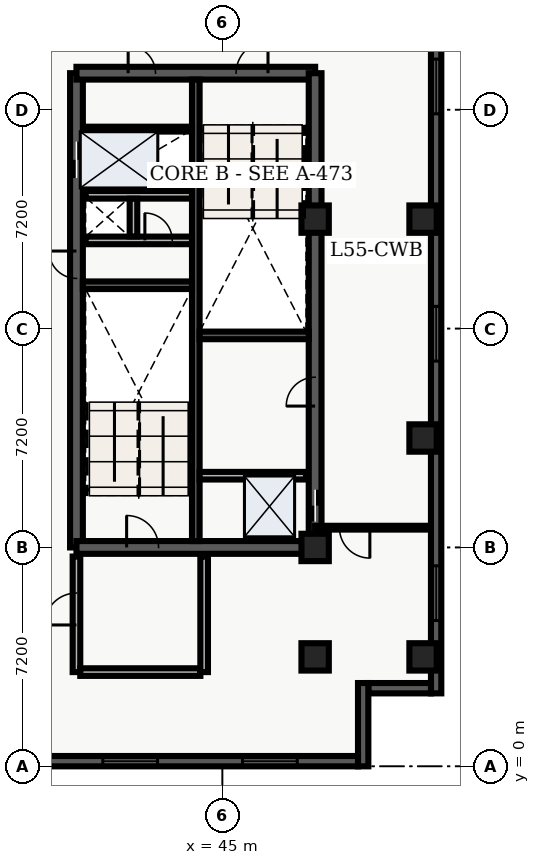
"""IFC4 building model, lengths in metres.
Left out: names, types, materials, properties, quantities, classifications, styles, units other than length and angle.
Written with IfcOpenShell. Run it as: python <this file> out.ifc"""

import sys

from ifc_helpers import new_model, entity, si_unit, converted_unit, direction, frame, origin_with_axes, origin_2d_with_axis, place, context, subcontext, project, spatial, polyline, rectangle, outline, extrude, element, fill, save


model = new_model("IFC4")
c1 = context("Model", 3, precision=1e-05, world=origin_with_axes(), true_north=direction((0.0, 1.0)))
c2 = subcontext(c1, "Body", "Model", "MODEL_VIEW")
j1 = project(units=[si_unit("LENGTHUNIT", "METRE"), converted_unit("PLANEANGLEUNIT", "DEGREE", entity("IfcPlaneAngleMeasure", 0.017), si_unit("PLANEANGLEUNIT", "RADIAN"), dimensions=[0, 0, 0, 0, 0, 0, 0])], contexts=[c1])
p1 = place(None, origin_with_axes())
s1 = spatial("IfcSite", under=j1, at=p1, CompositionType="ELEMENT")
p2 = place(p1, origin_with_axes())
s2 = spatial("IfcBuilding", under=s1, at=p2, CompositionType="ELEMENT")
p3 = place(p2, frame((0.0, 0.0, 224.7), z_axis=(0.0, 0.0, 1.0), x_axis=(1.0, 0.0, 0.0)))
s3 = spatial("IfcBuildingStorey", under=s2, at=p3, CompositionType="ELEMENT", Elevation=224.7)
p4 = place(p3, frame((40.2, 7.2, 0.0), z_axis=(0.0, 0.0, 1.0), x_axis=(0.0, 1.0, 0.0)))
e1 = element("IfcWall", 1, at=p4, inside=s3, PredefinedType="SHEAR", context=c2, shape_type="SweptSolid", body=[
    extrude(outline(polyline([(0.0, -0.21), (15.6, -0.21), (15.6, 0.21), (0.0, 0.21), (0.0, -0.21)])), origin_with_axes(), (0.0, 0.0, 1.0), 3.66),
])
p5 = place(p4, frame((12.75, 0.0, 0.0), z_axis=(0.0, 0.0, 1.0), x_axis=(1.0, 0.0, 0.0)))
e2 = element("IfcOpeningElement", 2, at=p5, cuts=e1, PredefinedType="OPENING", context=c2, shape_type="SweptSolid", body=[
    extrude(rectangle(XDim=1.2, YDim=0.44, at=origin_2d_with_axis()), origin_with_axes(), (0.0, 0.0, 1.0), 2.15),
])
p6 = place(p4, frame((9.3, 0.0, 0.0), z_axis=(0.0, 0.0, 1.0), x_axis=(1.0, 0.0, 0.0)))
e3 = element("IfcOpeningElement", 3, at=p6, cuts=e1, PredefinedType="OPENING", context=c2, shape_type="SweptSolid", body=[
    extrude(rectangle(XDim=0.9, YDim=0.44, at=origin_2d_with_axis()), origin_with_axes(), (0.0, 0.0, 1.0), 2.15),
])
p7 = place(p3, frame((40.2, 7.2, 0.0), z_axis=(0.0, 0.0, 1.0), x_axis=(1.0, 0.0, 0.0)))
e4 = element("IfcWall", 4, at=p7, inside=s3, PredefinedType="SHEAR", context=c2, shape_type="SweptSolid", body=[
    extrude(outline(polyline([(0.0, -0.21), (7.85, -0.21), (7.85, 0.21), (0.0, 0.21), (0.0, -0.21)])), origin_with_axes(), (0.0, 0.0, 1.0), 3.66),
])
p8 = place(p7, frame((2.175, 0.0, 0.0), z_axis=(0.0, 0.0, 1.0), x_axis=(1.0, 0.0, 0.0)))
e5 = element("IfcOpeningElement", 5, at=p8, cuts=e4, PredefinedType="OPENING", context=c2, shape_type="SweptSolid", body=[
    extrude(rectangle(XDim=1.05, YDim=0.44, at=origin_2d_with_axis()), origin_with_axes(), (0.0, 0.0, 1.0), 2.15),
])
p9 = place(p3, frame((40.2, 22.8, 0.0), z_axis=(0.0, 0.0, 1.0), x_axis=(1.0, 0.0, 0.0)))
e6 = element("IfcWall", 6, at=p9, inside=s3, PredefinedType="SHEAR", context=c2, shape_type="SweptSolid", body=[
    extrude(outline(polyline([(0.0, -0.21), (7.85, -0.21), (7.85, 0.21), (0.0, 0.21), (0.0, -0.21)])), origin_with_axes(), (0.0, 0.0, 1.0), 3.66),
])
p10 = place(p9, frame((5.775, 0.0, 0.0), z_axis=(0.0, 0.0, 1.0), x_axis=(1.0, 0.0, 0.0)))
e7 = element("IfcOpeningElement", 7, at=p10, cuts=e6, PredefinedType="OPENING", context=c2, shape_type="SweptSolid", body=[
    extrude(rectangle(XDim=1.05, YDim=0.44, at=origin_2d_with_axis()), origin_with_axes(), (0.0, 0.0, 1.0), 2.15),
])
p11 = place(p9, frame((2.15, 0.0, 0.0), z_axis=(0.0, 0.0, 1.0), x_axis=(1.0, 0.0, 0.0)))
e8 = element("IfcOpeningElement", 8, at=p11, cuts=e6, PredefinedType="OPENING", context=c2, shape_type="SweptSolid", body=[
    extrude(rectangle(XDim=0.9, YDim=0.44, at=origin_2d_with_axis()), origin_with_axes(), (0.0, 0.0, 1.0), 2.15),
])
p12 = place(p3, frame((48.05, 7.2, 0.0), z_axis=(0.0, 0.0, 1.0), x_axis=(0.0, 1.0, 0.0)))
e9 = element("IfcWall", 9, at=p12, inside=s3, PredefinedType="SHEAR", context=c2, shape_type="SweptSolid", body=[
    extrude(outline(polyline([(0.0, -0.21), (15.6, -0.21), (15.6, 0.21), (0.0, 0.21), (0.0, -0.21)])), origin_with_axes(), (0.0, 0.0, 1.0), 3.66),
])
p13 = place(p12, frame((1.375, 0.0, 0.0), z_axis=(0.0, 0.0, 1.0), x_axis=(1.0, 0.0, 0.0)))
e10 = element("IfcOpeningElement", 10, at=p13, cuts=e9, PredefinedType="OPENING", context=c2, shape_type="SweptSolid", body=[
    extrude(rectangle(XDim=1.05, YDim=0.44, at=origin_2d_with_axis()), origin_with_axes(), (0.0, 0.0, 1.0), 2.15),
])
p14 = place(p12, frame((5.125, 0.0, 0.0), z_axis=(0.0, 0.0, 1.0), x_axis=(1.0, 0.0, 0.0)))
e11 = element("IfcOpeningElement", 11, at=p14, cuts=e9, PredefinedType="OPENING", context=c2, shape_type="SweptSolid", body=[
    extrude(rectangle(XDim=0.95, YDim=0.44, at=origin_2d_with_axis()), origin_with_axes(), (0.0, 0.0, 1.0), 2.15),
])
p15 = place(p3, frame((44.125, 7.41, 0.0), z_axis=(0.0, 0.0, 1.0), x_axis=(0.0, 1.0, 0.0)))
e12 = element("IfcWall", 12, at=p15, inside=s3, PredefinedType="SHEAR", context=c2, shape_type="SweptSolid", body=[
    extrude(outline(polyline([(0.0, -0.125), (15.18, -0.125), (15.18, 0.125), (0.0, 0.125), (0.0, -0.125)])), origin_with_axes(), (0.0, 0.0, 1.0), 3.66),
])
for number, where, z_axis, x_axis in (
    (13, (40.41, 15.825, 0.0), (0.0, 0.0, 1.0), (1.0, 0.0, 0.0)),
    (14, (44.25, 14.175, 0.0), (0.0, 0.0, 1.0), (1.0, 0.0, 0.0)),
):
    element("IfcWall", number, at=place(p3, frame(where, z_axis=z_axis, x_axis=x_axis)), inside=s3, PredefinedType="SHEAR", context=c2, shape_type="SweptSolid", body=[
        extrude(outline(polyline([(0.0, -0.125), (3.59, -0.125), (3.59, 0.125), (0.0, 0.125), (0.0, -0.125)])), origin_with_axes(), (0.0, 0.0, 1.0), 3.66),
    ])
p16 = place(p3, frame((40.5, 17.3, 0.0), z_axis=(0.0, 0.0, 1.0), x_axis=(1.0, 0.0, 0.0)))
e15 = element("IfcWall", 15, at=p16, inside=s3, PredefinedType="SOLIDWALL", context=c2, shape_type="SweptSolid", body=[
    extrude(outline(polyline([(0.0, -0.125), (3.5, -0.125), (3.5, 0.125), (0.0, 0.125), (0.0, -0.125)])), origin_with_axes(), (0.0, 0.0, 1.0), 2.7),
])
p17 = place(p16, frame((2.4, 0.0, 0.0), z_axis=(0.0, 0.0, 1.0), x_axis=(1.0, 0.0, 0.0)))
e16 = element("IfcOpeningElement", 16, at=p17, cuts=e15, PredefinedType="OPENING", context=c2, shape_type="SweptSolid", body=[
    extrude(rectangle(XDim=0.9, YDim=0.27, at=origin_2d_with_axis()), origin_with_axes(), (0.0, 0.0, 1.0), 2.15),
])
p18 = place(p3, frame((40.5, 18.8, 0.0), z_axis=(0.0, 0.0, 1.0), x_axis=(1.0, 0.0, 0.0)))
e17 = element("IfcWall", 17, at=p18, inside=s3, PredefinedType="SOLIDWALL", context=c2, shape_type="SweptSolid", body=[
    extrude(outline(polyline([(0.0, -0.125), (3.5, -0.125), (3.5, 0.125), (0.0, 0.125), (0.0, -0.125)])), origin_with_axes(), (0.0, 0.0, 1.0), 2.7),
])
p19 = place(p3, frame((42.075, 17.43, 0.0), z_axis=(0.0, 0.0, 1.0), x_axis=(0.0, 1.0, 0.0)))
e18 = element("IfcWall", 18, at=p19, inside=s3, PredefinedType="SOLIDWALL", context=c2, shape_type="SweptSolid", body=[
    extrude(outline(polyline([(0.0, -0.125), (1.24, -0.125), (1.24, 0.125), (0.0, 0.125), (0.0, -0.125)])), origin_with_axes(), (0.0, 0.0, 1.0), 2.7),
])
p20 = place(p3, frame((40.2, 3.1, 0.0), z_axis=(0.0, 0.0, 1.0), x_axis=(0.0, 1.0, 0.0)))
e19 = element("IfcWall", 19, at=p20, inside=s3, PredefinedType="SOLIDWALL", context=c2, shape_type="SweptSolid", body=[
    extrude(outline(polyline([(0.0, -0.125), (3.8, -0.125), (3.8, 0.125), (0.0, 0.125), (0.0, -0.125)])), origin_with_axes(), (0.0, 0.0, 1.0), 2.7),
])
p21 = place(p20, frame((2.075, 0.0, 0.0), z_axis=(0.0, 0.0, 1.0), x_axis=(1.0, 0.0, 0.0)))
e20 = element("IfcOpeningElement", 20, at=p21, cuts=e19, PredefinedType="OPENING", context=c2, shape_type="SweptSolid", body=[
    extrude(rectangle(XDim=1.05, YDim=0.27, at=origin_2d_with_axis()), origin_with_axes(), (0.0, 0.0, 1.0), 2.15),
])
p22 = place(p3, frame((40.325, 3.1, 0.0), z_axis=(0.0, 0.0, 1.0), x_axis=(1.0, 0.0, 0.0)))
e21 = element("IfcWall", 21, at=p22, inside=s3, PredefinedType="SOLIDWALL", context=c2, shape_type="SweptSolid", body=[
    extrude(outline(polyline([(0.0, -0.125), (3.95, -0.125), (3.95, 0.125), (0.0, 0.125), (0.0, -0.125)])), origin_with_axes(), (0.0, 0.0, 1.0), 2.7),
])
p23 = place(p3, frame((44.4, 3.1, 0.0), z_axis=(0.0, 0.0, 1.0), x_axis=(0.0, 1.0, 0.0)))
e22 = element("IfcWall", 22, at=p23, inside=s3, PredefinedType="SOLIDWALL", context=c2, shape_type="SweptSolid", body=[
    extrude(outline(polyline([(0.0, -0.125), (3.8, -0.125), (3.8, 0.125), (0.0, 0.125), (0.0, -0.125)])), origin_with_axes(), (0.0, 0.0, 1.0), 2.7),
])
for number, where, z_axis, x_axis in (
    (23, (48.05, 3.6, 0.0), (0.0, 0.0, 1.0), (1.0, 0.0, 0.0)),
    (24, (48.05, 7.2, 0.0), (0.0, 0.0, 1.0), (1.0, 0.0, 0.0)),
    (25, (48.05, 18.0, 0.0), (0.0, 0.0, 1.0), (1.0, 0.0, 0.0)),
    (26, (51.6, 3.6, 0.0), (0.0, 0.0, 1.0), (1.0, 0.0, 0.0)),
    (27, (51.6, 10.8, 0.0), (0.0, 0.0, 1.0), (1.0, 0.0, 0.0)),
    (28, (51.6, 18.0, 0.0), (0.0, 0.0, 1.0), (1.0, 0.0, 0.0)),
):
    element("IfcColumn", number, at=place(p3, frame(where, z_axis=z_axis, x_axis=x_axis)), inside=s3, PredefinedType="COLUMN", context=c2, shape_type="SweptSolid", body=[
        extrude(rectangle(XDim=0.9, YDim=0.9, at=origin_2d_with_axis()), origin_with_axes(), (0.0, 0.0, 1.0), 3.9),
    ])
p24 = place(p3, frame((40.5, 20.96, 0.0), z_axis=(0.0, 0.0, 1.0), x_axis=(1.0, 0.0, 0.0)))
e29 = element("IfcWall", 29, at=p24, inside=s3, PredefinedType="PARTITIONING", context=c2, shape_type="SweptSolid", body=[
    extrude(outline(polyline([(0.0, -0.08), (3.5, -0.08), (3.5, 0.08), (0.0, 0.08), (0.0, -0.08)])), origin_with_axes(), (0.0, 0.0, 1.0), 2.7),
])
p25 = place(p3, frame((44.25, 9.56, 0.0), z_axis=(0.0, 0.0, 1.0), x_axis=(1.0, 0.0, 0.0)))
e30 = element("IfcWall", 30, at=p25, inside=s3, PredefinedType="SOLIDWALL", context=c2, shape_type="SweptSolid", body=[
    extrude(outline(polyline([(0.0, -0.125), (3.5, -0.125), (3.5, 0.125), (0.0, 0.125), (0.0, -0.125)])), origin_with_axes(), (0.0, 0.0, 1.0), 2.7),
])
p26 = place(p3, frame((51.865, 7.85, 0.0), z_axis=(0.0, 0.0, 1.0), x_axis=(-1.0, 0.0, 0.0)))
e31 = element("IfcWall", 31, at=p26, inside=s3, PredefinedType="PARTITIONING", context=c2, shape_type="SweptSolid", body=[
    extrude(outline(polyline([(0.0, -0.062), (3.815, -0.062), (3.815, 0.062), (0.0, 0.062), (0.0, -0.062)])), origin_with_axes(), (0.0, 0.0, 1.0), 2.7),
])
p27 = place(p26, frame((2.515, 0.0, 0.0), z_axis=(0.0, 0.0, 1.0), x_axis=(1.0, 0.0, 0.0)))
e32 = element("IfcOpeningElement", 32, at=p27, cuts=e31, PredefinedType="OPENING", context=c2, shape_type="SweptSolid", body=[
    extrude(rectangle(XDim=1.0, YDim=0.145, at=origin_2d_with_axis()), origin_with_axes(), (0.0, 0.0, 1.0), 2.15),
])
p28 = place(p3, frame((52.03, 26.06, 0.0), z_axis=(0.0, 0.0, 1.0), x_axis=(0.0, -1.0, 0.0)))
e33 = element("IfcWall", 33, at=p28, inside=s3, PredefinedType="SOLIDWALL", context=c2, shape_type="SweptSolid", body=[
    extrude(outline(polyline([(0.0, -0.17), (23.66, -0.17), (23.66, 0.17), (0.0, 0.17), (0.0, -0.17)])), origin_with_axes(), (0.0, 0.0, 1.0), 3.66),
])
p29 = place(p28, frame((3.696, 0.0, 0.45), z_axis=(0.0, 0.0, 1.0), x_axis=(1.0, 0.0, 0.0)))
e34 = element("IfcOpeningElement", 34, at=p29, cuts=e33, PredefinedType="OPENING", context=c2, shape_type="SweptSolid", body=[
    extrude(rectangle(XDim=1.8, YDim=0.36, at=origin_2d_with_axis()), origin_with_axes(), (0.0, 0.0, 1.0), 2.1),
])
p30 = place(p28, frame((11.83, 0.0, 0.45), z_axis=(0.0, 0.0, 1.0), x_axis=(1.0, 0.0, 0.0)))
e35 = element("IfcOpeningElement", 35, at=p30, cuts=e33, PredefinedType="OPENING", context=c2, shape_type="SweptSolid", body=[
    extrude(rectangle(XDim=1.8, YDim=0.36, at=origin_2d_with_axis()), origin_with_axes(), (0.0, 0.0, 1.0), 2.1),
])
p31 = place(p28, frame((20.364, 0.0, 0.45), z_axis=(0.0, 0.0, 1.0), x_axis=(1.0, 0.0, 0.0)))
e36 = element("IfcOpeningElement", 36, at=p31, cuts=e33, PredefinedType="OPENING", context=c2, shape_type="SweptSolid", body=[
    extrude(rectangle(XDim=1.8, YDim=0.36, at=origin_2d_with_axis()), origin_with_axes(), (0.0, 0.0, 1.0), 2.1),
])
p32 = place(p3, frame((51.86, 2.57, 0.0), z_axis=(0.0, 0.0, 1.0), x_axis=(-1.0, 0.0, 0.0)))
e37 = element("IfcWall", 37, at=p32, inside=s3, PredefinedType="SOLIDWALL", context=c2, shape_type="SweptSolid", body=[
    extrude(outline(polyline([(0.0, -0.17), (2.06, -0.17), (2.06, 0.17), (0.0, 0.17), (0.0, -0.17)])), origin_with_axes(), (0.0, 0.0, 1.0), 3.66),
])
p33 = place(p3, frame((49.63, 2.74, 0.0), z_axis=(0.0, 0.0, 1.0), x_axis=(0.0, -1.0, 0.0)))
e38 = element("IfcWall", 38, at=p33, inside=s3, PredefinedType="SOLIDWALL", context=c2, shape_type="SweptSolid", body=[
    extrude(outline(polyline([(0.0, -0.17), (2.74, -0.17), (2.74, 0.17), (0.0, 0.17), (0.0, -0.17)])), origin_with_axes(), (0.0, 0.0, 1.0), 3.66),
])
p34 = place(p3, frame((49.46, 0.17, 0.0), z_axis=(0.0, 0.0, 1.0), x_axis=(-1.0, 0.0, 0.0)))
e39 = element("IfcWall", 39, at=p34, inside=s3, PredefinedType="SOLIDWALL", context=c2, shape_type="SweptSolid", body=[
    extrude(outline(polyline([(0.0, -0.17), (42.56, -0.17), (42.56, 0.17), (0.0, 0.17), (0.0, -0.17)])), origin_with_axes(), (0.0, 0.0, 1.0), 3.66),
])
p35 = place(p34, frame((2.898, 0.0, 0.45), z_axis=(0.0, 0.0, 1.0), x_axis=(1.0, 0.0, 0.0)))
e40 = element("IfcOpeningElement", 40, at=p35, cuts=e39, PredefinedType="OPENING", context=c2, shape_type="SweptSolid", body=[
    extrude(rectangle(XDim=1.8, YDim=0.36, at=origin_2d_with_axis()), origin_with_axes(), (0.0, 0.0, 1.0), 2.1),
])
p36 = place(p34, frame((7.493, 0.0, 0.45), z_axis=(0.0, 0.0, 1.0), x_axis=(1.0, 0.0, 0.0)))
e41 = element("IfcOpeningElement", 41, at=p36, cuts=e39, PredefinedType="OPENING", context=c2, shape_type="SweptSolid", body=[
    extrude(rectangle(XDim=1.8, YDim=0.36, at=origin_2d_with_axis()), origin_with_axes(), (0.0, 0.0, 1.0), 2.1),
])
p37 = place(p34, frame((12.089, 0.0, 0.45), z_axis=(0.0, 0.0, 1.0), x_axis=(1.0, 0.0, 0.0)))
e42 = element("IfcOpeningElement", 42, at=p37, cuts=e39, PredefinedType="OPENING", context=c2, shape_type="SweptSolid", body=[
    extrude(rectangle(XDim=1.8, YDim=0.36, at=origin_2d_with_axis()), origin_with_axes(), (0.0, 0.0, 1.0), 2.1),
])
p38 = place(p34, frame((16.684, 0.0, 0.45), z_axis=(0.0, 0.0, 1.0), x_axis=(1.0, 0.0, 0.0)))
e43 = element("IfcOpeningElement", 43, at=p38, cuts=e39, PredefinedType="OPENING", context=c2, shape_type="SweptSolid", body=[
    extrude(rectangle(XDim=1.8, YDim=0.36, at=origin_2d_with_axis()), origin_with_axes(), (0.0, 0.0, 1.0), 2.1),
])
p39 = place(p34, frame((20.43, 0.0, 0.45), z_axis=(0.0, 0.0, 1.0), x_axis=(1.0, 0.0, 0.0)))
e44 = element("IfcOpeningElement", 44, at=p39, cuts=e39, PredefinedType="OPENING", context=c2, shape_type="SweptSolid", body=[
    extrude(rectangle(XDim=1.8, YDim=0.36, at=origin_2d_with_axis()), origin_with_axes(), (0.0, 0.0, 1.0), 2.1),
])
p40 = place(p34, frame((25.876, 0.0, 0.45), z_axis=(0.0, 0.0, 1.0), x_axis=(1.0, 0.0, 0.0)))
e45 = element("IfcOpeningElement", 45, at=p40, cuts=e39, PredefinedType="OPENING", context=c2, shape_type="SweptSolid", body=[
    extrude(rectangle(XDim=1.8, YDim=0.36, at=origin_2d_with_axis()), origin_with_axes(), (0.0, 0.0, 1.0), 2.1),
])
p41 = place(p34, frame((30.471, 0.0, 0.45), z_axis=(0.0, 0.0, 1.0), x_axis=(1.0, 0.0, 0.0)))
e46 = element("IfcOpeningElement", 46, at=p41, cuts=e39, PredefinedType="OPENING", context=c2, shape_type="SweptSolid", body=[
    extrude(rectangle(XDim=1.8, YDim=0.36, at=origin_2d_with_axis()), origin_with_axes(), (0.0, 0.0, 1.0), 2.1),
])
p42 = place(p34, frame((34.617, 0.0, 0.45), z_axis=(0.0, 0.0, 1.0), x_axis=(1.0, 0.0, 0.0)))
e47 = element("IfcOpeningElement", 47, at=p42, cuts=e39, PredefinedType="OPENING", context=c2, shape_type="SweptSolid", body=[
    extrude(rectangle(XDim=1.8, YDim=0.36, at=origin_2d_with_axis()), origin_with_axes(), (0.0, 0.0, 1.0), 2.1),
])
p43 = place(p34, frame((39.662, 0.0, 0.45), z_axis=(0.0, 0.0, 1.0), x_axis=(1.0, 0.0, 0.0)))
e48 = element("IfcOpeningElement", 48, at=p43, cuts=e39, PredefinedType="OPENING", context=c2, shape_type="SweptSolid", body=[
    extrude(rectangle(XDim=1.8, YDim=0.36, at=origin_2d_with_axis()), origin_with_axes(), (0.0, 0.0, 1.0), 2.1),
])
p44 = place(p12, frame((1.375, 0.0, 0.0), z_axis=(0.0, 0.0, 1.0), x_axis=(1.0, 0.0, 0.0)))
e49 = element("IfcDoor", 49, at=p44, inside=s3, OperationType="SLIDING_TO_LEFT", PredefinedType="DOOR", context=c2, shape_type="SweptSolid", body=[
    extrude(rectangle(XDim=1.05, YDim=0.09, at=origin_2d_with_axis()), origin_with_axes(), (0.0, 0.0, 1.0), 2.15),
])
fill(e10, e49)
p45 = place(p4, frame((12.75, 0.0, 0.0), z_axis=(0.0, 0.0, 1.0), x_axis=(1.0, 0.0, 0.0)))
e50 = element("IfcDoor", 50, at=p45, inside=s3, OperationType="DOUBLE_DOOR_SLIDING", PredefinedType="DOOR", context=c2, shape_type="SweptSolid", body=[
    extrude(rectangle(XDim=1.2, YDim=0.09, at=origin_2d_with_axis()), origin_with_axes(), (0.0, 0.0, 1.0), 2.15),
])
fill(e2, e50)
p46 = place(p4, frame((9.3, 0.0, 0.0), z_axis=(0.0, 0.0, 1.0), x_axis=(1.0, 0.0, 0.0)))
e51 = element("IfcDoor", 51, at=p46, inside=s3, OperationType="SINGLE_SWING_RIGHT", PredefinedType="DOOR", context=c2, shape_type="SweptSolid", body=[
    extrude(rectangle(XDim=0.9, YDim=0.09, at=origin_2d_with_axis()), origin_with_axes(), (0.0, 0.0, 1.0), 2.15),
])
fill(e3, e51)
p47 = place(p16, frame((2.4, 0.0, 0.0), z_axis=(0.0, 0.0, 1.0), x_axis=(1.0, 0.0, 0.0)))
e52 = element("IfcDoor", 52, at=p47, inside=s3, OperationType="SINGLE_SWING_LEFT", PredefinedType="DOOR", context=c2, shape_type="SweptSolid", body=[
    extrude(rectangle(XDim=0.9, YDim=0.09, at=origin_2d_with_axis()), origin_with_axes(), (0.0, 0.0, 1.0), 2.15),
])
fill(e16, e52)
p48 = place(p7, frame((2.175, 0.0, 0.0), z_axis=(0.0, 0.0, 1.0), x_axis=(1.0, 0.0, 0.0)))
e53 = element("IfcDoor", 53, at=p48, inside=s3, OperationType="SINGLE_SWING_LEFT", PredefinedType="DOOR", context=c2, shape_type="SweptSolid", body=[
    extrude(rectangle(XDim=1.05, YDim=0.09, at=origin_2d_with_axis()), origin_with_axes(), (0.0, 0.0, 1.0), 2.15),
])
fill(e5, e53)
p49 = place(p9, frame((5.775, 0.0, 0.0), z_axis=(0.0, 0.0, 1.0), x_axis=(1.0, 0.0, 0.0)))
e54 = element("IfcDoor", 54, at=p49, inside=s3, OperationType="SINGLE_SWING_RIGHT", PredefinedType="DOOR", context=c2, shape_type="SweptSolid", body=[
    extrude(rectangle(XDim=1.05, YDim=0.09, at=origin_2d_with_axis()), origin_with_axes(), (0.0, 0.0, 1.0), 2.15),
])
fill(e7, e54)
p50 = place(p20, frame((2.075, 0.0, 0.0), z_axis=(0.0, 0.0, 1.0), x_axis=(1.0, 0.0, 0.0)))
e55 = element("IfcDoor", 55, at=p50, inside=s3, OperationType="SINGLE_SWING_LEFT", PredefinedType="DOOR", context=c2, shape_type="SweptSolid", body=[
    extrude(rectangle(XDim=1.05, YDim=0.09, at=origin_2d_with_axis()), origin_with_axes(), (0.0, 0.0, 1.0), 2.15),
])
fill(e20, e55)
p51 = place(p9, frame((2.15, 0.0, 0.0), z_axis=(0.0, 0.0, 1.0), x_axis=(1.0, 0.0, 0.0)))
e56 = element("IfcDoor", 56, at=p51, inside=s3, OperationType="SINGLE_SWING_LEFT", PredefinedType="DOOR", context=c2, shape_type="SweptSolid", body=[
    extrude(rectangle(XDim=0.9, YDim=0.09, at=origin_2d_with_axis()), origin_with_axes(), (0.0, 0.0, 1.0), 2.15),
])
fill(e8, e56)
p52 = place(p12, frame((5.125, 0.0, 0.0), z_axis=(0.0, 0.0, 1.0), x_axis=(1.0, 0.0, 0.0)))
e57 = element("IfcDoor", 57, at=p52, inside=s3, OperationType="SINGLE_SWING_LEFT", PredefinedType="DOOR", context=c2, shape_type="SweptSolid", body=[
    extrude(rectangle(XDim=0.95, YDim=0.09, at=origin_2d_with_axis()), origin_with_axes(), (0.0, 0.0, 1.0), 2.15),
])
fill(e11, e57)
p53 = place(p26, frame((2.515, 0.0, 0.0), z_axis=(0.0, 0.0, 1.0), x_axis=(1.0, 0.0, 0.0)))
e58 = element("IfcDoor", 58, at=p53, inside=s3, OperationType="SINGLE_SWING_LEFT", PredefinedType="DOOR", context=c2, shape_type="SweptSolid", body=[
    extrude(rectangle(XDim=1.0, YDim=0.075, at=origin_2d_with_axis()), origin_with_axes(), (0.0, 0.0, 1.0), 2.15),
])
fill(e32, e58)
p54 = place(p28, frame((3.696, 0.0, 0.45), z_axis=(0.0, 0.0, 1.0), x_axis=(1.0, 0.0, 0.0)))
e59 = element("IfcWindow", 59, at=p54, inside=s3, PredefinedType="WINDOW", context=c2, shape_type="SweptSolid", body=[
    extrude(rectangle(XDim=1.8, YDim=0.09, at=origin_2d_with_axis()), origin_with_axes(), (0.0, 0.0, 1.0), 2.1),
])
fill(e34, e59)
p55 = place(p28, frame((11.83, 0.0, 0.45), z_axis=(0.0, 0.0, 1.0), x_axis=(1.0, 0.0, 0.0)))
e60 = element("IfcWindow", 60, at=p55, inside=s3, PredefinedType="WINDOW", context=c2, shape_type="SweptSolid", body=[
    extrude(rectangle(XDim=1.8, YDim=0.09, at=origin_2d_with_axis()), origin_with_axes(), (0.0, 0.0, 1.0), 2.1),
])
fill(e35, e60)
p56 = place(p28, frame((20.364, 0.0, 0.45), z_axis=(0.0, 0.0, 1.0), x_axis=(1.0, 0.0, 0.0)))
e61 = element("IfcWindow", 61, at=p56, inside=s3, PredefinedType="WINDOW", context=c2, shape_type="SweptSolid", body=[
    extrude(rectangle(XDim=1.8, YDim=0.09, at=origin_2d_with_axis()), origin_with_axes(), (0.0, 0.0, 1.0), 2.1),
])
fill(e36, e61)
p57 = place(p34, frame((2.898, 0.0, 0.45), z_axis=(0.0, 0.0, 1.0), x_axis=(1.0, 0.0, 0.0)))
e62 = element("IfcWindow", 62, at=p57, inside=s3, PredefinedType="WINDOW", context=c2, shape_type="SweptSolid", body=[
    extrude(rectangle(XDim=1.8, YDim=0.09, at=origin_2d_with_axis()), origin_with_axes(), (0.0, 0.0, 1.0), 2.1),
])
fill(e40, e62)
p58 = place(p34, frame((7.493, 0.0, 0.45), z_axis=(0.0, 0.0, 1.0), x_axis=(1.0, 0.0, 0.0)))
e63 = element("IfcWindow", 63, at=p58, inside=s3, PredefinedType="WINDOW", context=c2, shape_type="SweptSolid", body=[
    extrude(rectangle(XDim=1.8, YDim=0.09, at=origin_2d_with_axis()), origin_with_axes(), (0.0, 0.0, 1.0), 2.1),
])
fill(e41, e63)
save(model, sys.argv[1])
